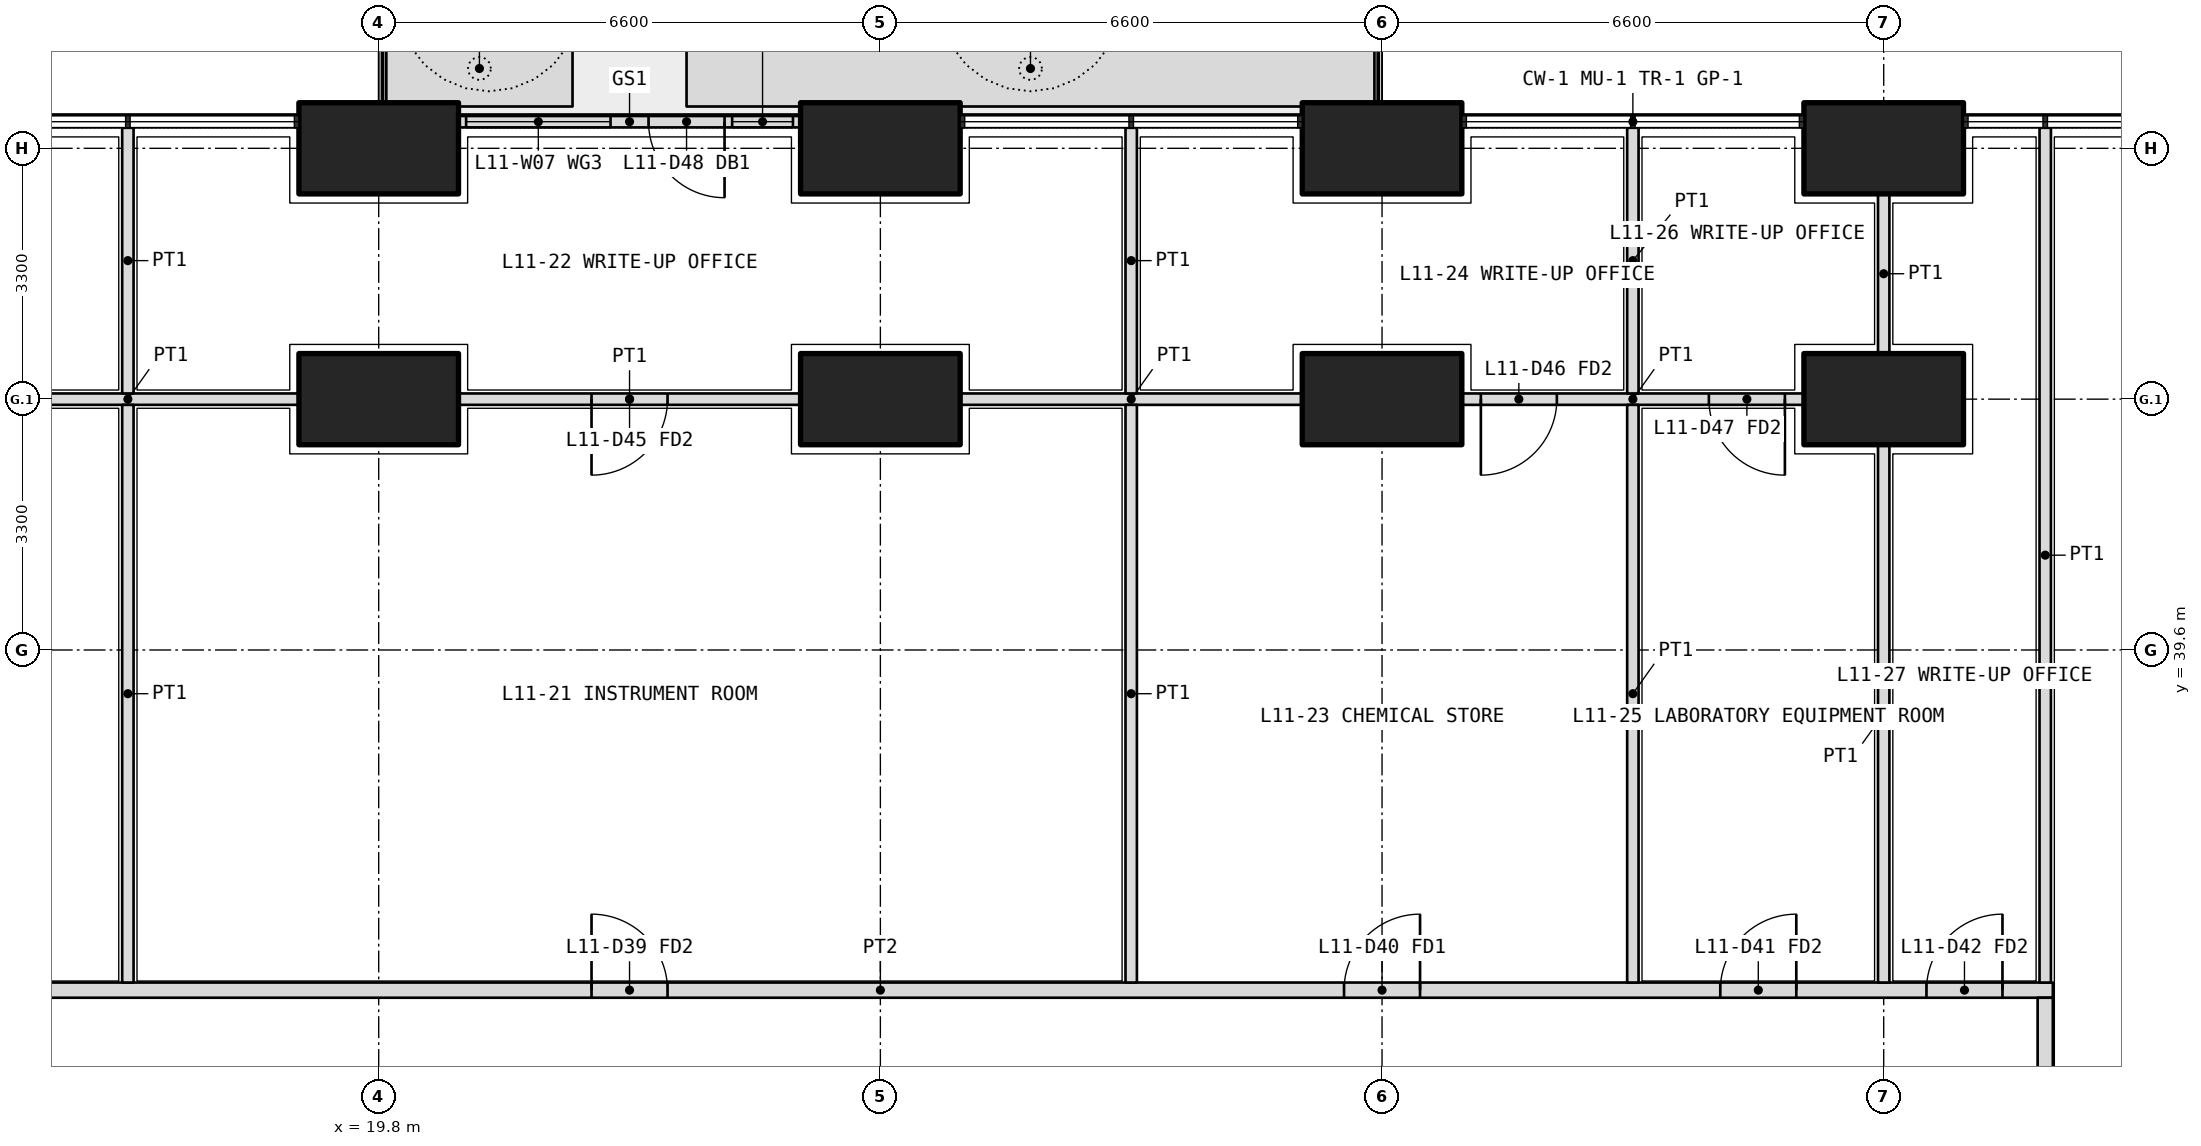
"""IFC4 building model, lengths in metres.
Left out: names, types, materials, properties, quantities, classifications, styles, units other than length and angle.
Written with IfcOpenShell. Run it as: python <this file> out.ifc"""

import sys

from ifc_helpers import new_model, si_unit, direction, frame, frame_2d, origin, origin_2d, place, context, subcontext, project, spatial, polyline, rectangle, outline, extrude, element, fill, save


model = new_model("IFC4")
c1 = context("Model", 3, precision=1e-05, world=origin(), true_north=direction((0.0, 1.0)))
c2 = subcontext(c1, "Body", "Model", "MODEL_VIEW")
j1 = project(units=[si_unit("LENGTHUNIT", "METRE"), si_unit("PLANEANGLEUNIT", "RADIAN")], contexts=[c1])
p1 = place(None, origin())
s1 = spatial("IfcSite", under=j1, at=p1, CompositionType="ELEMENT")
p2 = place(p1, origin())
s2 = spatial("IfcBuilding", under=s1, at=p2, CompositionType="ELEMENT")
p3 = place(p2, frame((0.0, 0.0, 50.7)))
s3 = spatial("IfcBuildingStorey", under=s2, at=p3, CompositionType="ELEMENT", Elevation=50.7)
for number, where, z_axis, x_axis in (
    (1, (19.8, 46.2, 0.0), (0.0, 0.0, 1.0), (1.0, 0.0, 0.0)),
    (2, (26.4, 46.2, 0.0), (0.0, 0.0, 1.0), (1.0, 0.0, 0.0)),
    (3, (33.0, 46.2, 0.0), (0.0, 0.0, 1.0), (1.0, 0.0, 0.0)),
    (4, (39.6, 46.2, 0.0), (0.0, 0.0, 1.0), (1.0, 0.0, 0.0)),
    (5, (19.8, 42.9, 0.0), (0.0, 0.0, 1.0), (1.0, 0.0, 0.0)),
    (6, (26.4, 42.9, 0.0), (0.0, 0.0, 1.0), (1.0, 0.0, 0.0)),
    (7, (33.0, 42.9, 0.0), (0.0, 0.0, 1.0), (1.0, 0.0, 0.0)),
    (8, (39.6, 42.9, 0.0), (0.0, 0.0, 1.0), (1.0, 0.0, 0.0)),
):
    element("IfcColumn", number, at=place(p3, frame(where, z_axis=z_axis, x_axis=x_axis)), inside=s3, PredefinedType="COLUMN", context=c2, shape_type="SweptSolid", body=[
        extrude(rectangle(XDim=2.1, YDim=1.2, at=origin_2d()), origin(), (0.0, 0.0, 1.0), 4.2),
    ])
p4 = place(p3, origin())
e9 = element("IfcWall", 9, at=p4, inside=s3, PredefinedType="USERDEFINED", context=c2, shape_type="SweptSolid", body=[
    extrude(outline(polyline([(19.9, 46.75), (22.35, 46.75), (22.35, 47.75), (19.9, 47.75), (19.9, 46.75)]), holes=[polyline([(20.05, 46.9), (22.2, 46.9), (22.2, 47.6), (20.05, 47.6), (20.05, 46.9)])]), origin(), (0.0, 0.0, 1.0), 1.05),
])
p5 = place(p3, origin())
e10 = element("IfcWall", 10, at=p5, inside=s3, PredefinedType="USERDEFINED", context=c2, shape_type="SweptSolid", body=[
    extrude(outline(polyline([(23.85, 46.75), (32.9, 46.75), (32.9, 47.75), (23.85, 47.75), (23.85, 46.75)]), holes=[polyline([(24.0, 46.9), (32.75, 46.9), (32.75, 47.6), (24.0, 47.6), (24.0, 46.9)])]), origin(), (0.0, 0.0, 1.0), 1.05),
])
p6 = place(p3, frame((25.35, 46.55, 0.0), z_axis=(0.0, 0.0, 1.0), x_axis=(-1.0, 0.0, 0.0)))
e11 = element("IfcWall", 11, at=p6, inside=s3, PredefinedType="SOLIDWALL", context=c2, shape_type="SweptSolid", body=[
    extrude(rectangle(XDim=4.5, YDim=0.15, at=frame_2d((2.25, 0.0))), origin(), (0.0, 0.0, 1.0), 2.7),
])
p7 = place(p6, frame((1.0, 0.0, 0.0)))
e12 = element("IfcOpeningElement", 12, at=p7, cuts=e11, PredefinedType="OPENING", context=c2, shape_type="SweptSolid", body=[
    extrude(rectangle(XDim=1.0, YDim=2.4, at=frame_2d((0.5, 1.2))), frame((0.0, 0.085, 0.0), z_axis=(0.0, -1.0, 0.0), x_axis=(1.0, 0.0, 0.0)), (0.0, 0.0, 1.0), 0.17),
])
p8 = place(p6, frame((0.1, 0.0, 0.1)))
e13 = element("IfcOpeningElement", 13, at=p8, cuts=e11, PredefinedType="OPENING", context=c2, shape_type="SweptSolid", body=[
    extrude(rectangle(XDim=0.8, YDim=2.3, at=frame_2d((0.4, 1.15))), frame((0.0, 0.085, 0.0), z_axis=(0.0, -1.0, 0.0), x_axis=(1.0, 0.0, 0.0)), (0.0, 0.0, 1.0), 0.17),
])
p9 = place(p6, frame((2.5, 0.0, 0.1)))
e14 = element("IfcOpeningElement", 14, at=p9, cuts=e11, PredefinedType="OPENING", context=c2, shape_type="SweptSolid", body=[
    extrude(rectangle(XDim=1.9, YDim=2.3, at=frame_2d((0.95, 1.15))), frame((0.0, 0.085, 0.0), z_axis=(0.0, -1.0, 0.0), x_axis=(1.0, 0.0, 0.0)), (0.0, 0.0, 1.0), 0.17),
])
p10 = place(p3, frame((10.975, 35.125, 0.0), z_axis=(0.0, 0.0, 1.0), x_axis=(1.0, 0.0, 0.0)))
e15 = element("IfcWall", 15, at=p10, inside=s3, PredefinedType="PARTITIONING", context=c2, shape_type="SweptSolid", body=[
    extrude(rectangle(XDim=30.85, YDim=0.2, at=frame_2d((15.425, 0.0))), origin(), (0.0, 0.0, 1.0), 2.85),
])
p11 = place(p10, frame((2.312, 0.0, 0.0)))
e16 = element("IfcOpeningElement", 16, at=p11, cuts=e15, PredefinedType="OPENING", context=c2, shape_type="SweptSolid", body=[
    extrude(rectangle(XDim=1.0, YDim=2.1, at=frame_2d((0.5, 1.05))), frame((0.0, 0.11, 0.0), z_axis=(0.0, -1.0, 0.0), x_axis=(1.0, 0.0, 0.0)), (0.0, 0.0, 1.0), 0.22),
])
p12 = place(p10, frame((11.625, 0.0, 0.0)))
e17 = element("IfcOpeningElement", 17, at=p12, cuts=e15, PredefinedType="OPENING", context=c2, shape_type="SweptSolid", body=[
    extrude(rectangle(XDim=1.0, YDim=2.1, at=frame_2d((0.5, 1.05))), frame((0.0, 0.11, 0.0), z_axis=(0.0, -1.0, 0.0), x_axis=(1.0, 0.0, 0.0)), (0.0, 0.0, 1.0), 0.22),
])
p13 = place(p10, frame((21.525, 0.0, 0.0)))
e18 = element("IfcOpeningElement", 18, at=p13, cuts=e15, PredefinedType="OPENING", context=c2, shape_type="SweptSolid", body=[
    extrude(rectangle(XDim=1.0, YDim=2.1, at=frame_2d((0.5, 1.05))), frame((0.0, 0.11, 0.0), z_axis=(0.0, -1.0, 0.0), x_axis=(1.0, 0.0, 0.0)), (0.0, 0.0, 1.0), 0.22),
])
p14 = place(p10, frame((26.475, 0.0, 0.0)))
e19 = element("IfcOpeningElement", 19, at=p14, cuts=e15, PredefinedType="OPENING", context=c2, shape_type="SweptSolid", body=[
    extrude(rectangle(XDim=1.0, YDim=2.1, at=frame_2d((0.5, 1.05))), frame((0.0, 0.11, 0.0), z_axis=(0.0, -1.0, 0.0), x_axis=(1.0, 0.0, 0.0)), (0.0, 0.0, 1.0), 0.22),
])
p15 = place(p10, frame((29.188, 0.0, 0.0)))
e20 = element("IfcOpeningElement", 20, at=p15, cuts=e15, PredefinedType="OPENING", context=c2, shape_type="SweptSolid", body=[
    extrude(rectangle(XDim=1.0, YDim=2.1, at=frame_2d((0.5, 1.05))), frame((0.0, 0.11, 0.0), z_axis=(0.0, -1.0, 0.0), x_axis=(1.0, 0.0, 0.0)), (0.0, 0.0, 1.0), 0.22),
])
p16 = place(p3, frame((41.725, 11.175, 0.0), z_axis=(0.0, 0.0, 1.0), x_axis=(0.0, 1.0, 0.0)))
e21 = element("IfcWall", 21, at=p16, inside=s3, PredefinedType="PARTITIONING", context=c2, shape_type="SweptSolid", body=[
    extrude(rectangle(XDim=23.85, YDim=0.2, at=frame_2d((11.925, 0.0))), origin(), (0.0, 0.0, 1.0), 2.85),
])
p17 = place(p16, frame((2.012, 0.0, 0.0)))
e22 = element("IfcOpeningElement", 22, at=p17, cuts=e21, PredefinedType="OPENING", context=c2, shape_type="SweptSolid", body=[
    extrude(rectangle(XDim=1.2, YDim=2.1, at=frame_2d((0.6, 1.05))), frame((0.0, 0.11, 0.0), z_axis=(0.0, -1.0, 0.0), x_axis=(1.0, 0.0, 0.0)), (0.0, 0.0, 1.0), 0.22),
])
p18 = place(p16, frame((6.475, 0.0, 0.0)))
e23 = element("IfcOpeningElement", 23, at=p18, cuts=e21, PredefinedType="OPENING", context=c2, shape_type="SweptSolid", body=[
    extrude(rectangle(XDim=1.0, YDim=2.1, at=frame_2d((0.5, 1.05))), frame((0.0, 0.11, 0.0), z_axis=(0.0, -1.0, 0.0), x_axis=(1.0, 0.0, 0.0)), (0.0, 0.0, 1.0), 0.22),
])
p19 = place(p16, frame((9.725, 0.0, 0.0)))
e24 = element("IfcOpeningElement", 24, at=p19, cuts=e21, PredefinedType="OPENING", context=c2, shape_type="SweptSolid", body=[
    extrude(rectangle(XDim=1.0, YDim=2.1, at=frame_2d((0.5, 1.05))), frame((0.0, 0.11, 0.0), z_axis=(0.0, -1.0, 0.0), x_axis=(1.0, 0.0, 0.0)), (0.0, 0.0, 1.0), 0.22),
])
p20 = place(p16, frame((13.075, 0.0, 0.0)))
e25 = element("IfcOpeningElement", 25, at=p20, cuts=e21, PredefinedType="OPENING", context=c2, shape_type="SweptSolid", body=[
    extrude(rectangle(XDim=0.9, YDim=2.1, at=frame_2d((0.45, 1.05))), frame((0.0, 0.11, 0.0), z_axis=(0.0, -1.0, 0.0), x_axis=(1.0, 0.0, 0.0)), (0.0, 0.0, 1.0), 0.22),
])
p21 = place(p16, frame((16.375, 0.0, 0.0)))
e26 = element("IfcOpeningElement", 26, at=p21, cuts=e21, PredefinedType="OPENING", context=c2, shape_type="SweptSolid", body=[
    extrude(rectangle(XDim=1.0, YDim=2.1, at=frame_2d((0.5, 1.05))), frame((0.0, 0.11, 0.0), z_axis=(0.0, -1.0, 0.0), x_axis=(1.0, 0.0, 0.0)), (0.0, 0.0, 1.0), 0.22),
])
p22 = place(p16, frame((20.738, 0.0, 0.0)))
e27 = element("IfcOpeningElement", 27, at=p22, cuts=e21, PredefinedType="OPENING", context=c2, shape_type="SweptSolid", body=[
    extrude(rectangle(XDim=1.0, YDim=2.1, at=frame_2d((0.5, 1.05))), frame((0.0, 0.11, 0.0), z_axis=(0.0, -1.0, 0.0), x_axis=(1.0, 0.0, 0.0)), (0.0, 0.0, 1.0), 0.22),
])
p23 = place(p3, frame((41.725, 46.47, 0.0), z_axis=(0.0, 0.0, 1.0), x_axis=(0.0, -1.0, 0.0)))
e28 = element("IfcWall", 28, at=p23, inside=s3, PredefinedType="PARTITIONING", context=c2, shape_type="SweptSolid", body=[
    extrude(rectangle(XDim=11.245, YDim=0.15, at=frame_2d((5.623, 0.0))), origin(), (0.0, 0.0, 1.0), 2.7),
])
p24 = place(p3, frame((38.55, 42.9, 0.0), z_axis=(0.0, 0.0, 1.0), x_axis=(-1.0, 0.0, 0.0)))
e29 = element("IfcWall", 29, at=p24, inside=s3, PredefinedType="PARTITIONING", context=c2, shape_type="SweptSolid", body=[
    extrude(rectangle(XDim=4.5, YDim=0.15, at=frame_2d((2.25, 0.0))), origin(), (0.0, 0.0, 1.0), 3.9),
])
p25 = place(p24, frame((3.25, 0.0, 0.0)))
e30 = element("IfcOpeningElement", 30, at=p25, cuts=e29, PredefinedType="OPENING", context=c2, shape_type="SweptSolid", body=[
    extrude(rectangle(XDim=1.0, YDim=2.1, at=frame_2d((0.5, 1.05))), frame((0.0, 0.085, 0.0), z_axis=(0.0, -1.0, 0.0), x_axis=(1.0, 0.0, 0.0)), (0.0, 0.0, 1.0), 0.17),
])
p26 = place(p24, frame((0.25, 0.0, 0.0)))
e31 = element("IfcOpeningElement", 31, at=p26, cuts=e29, PredefinedType="OPENING", context=c2, shape_type="SweptSolid", body=[
    extrude(rectangle(XDim=1.0, YDim=2.1, at=frame_2d((0.5, 1.05))), frame((0.0, 0.085, 0.0), z_axis=(0.0, -1.0, 0.0), x_axis=(1.0, 0.0, 0.0)), (0.0, 0.0, 1.0), 0.17),
])
p27 = place(p3, frame((31.95, 42.9, 0.0), z_axis=(0.0, 0.0, 1.0), x_axis=(-1.0, 0.0, 0.0)))
e32 = element("IfcWall", 32, at=p27, inside=s3, PredefinedType="PARTITIONING", context=c2, shape_type="SweptSolid", body=[
    extrude(rectangle(XDim=4.5, YDim=0.15, at=frame_2d((2.25, 0.0))), origin(), (0.0, 0.0, 1.0), 3.9),
])
p28 = place(p3, frame((25.35, 42.9, 0.0), z_axis=(0.0, 0.0, 1.0), x_axis=(-1.0, 0.0, 0.0)))
e33 = element("IfcWall", 33, at=p28, inside=s3, PredefinedType="PARTITIONING", context=c2, shape_type="SweptSolid", body=[
    extrude(rectangle(XDim=4.5, YDim=0.15, at=frame_2d((2.25, 0.0))), origin(), (0.0, 0.0, 1.0), 3.9),
])
p29 = place(p28, frame((1.75, 0.0, 0.0)))
e34 = element("IfcOpeningElement", 34, at=p29, cuts=e33, PredefinedType="OPENING", context=c2, shape_type="SweptSolid", body=[
    extrude(rectangle(XDim=1.0, YDim=2.1, at=frame_2d((0.5, 1.05))), frame((0.0, 0.085, 0.0), z_axis=(0.0, -1.0, 0.0), x_axis=(1.0, 0.0, 0.0)), (0.0, 0.0, 1.0), 0.17),
])
p30 = place(p3, frame((18.75, 42.9, 0.0), z_axis=(0.0, 0.0, 1.0), x_axis=(-1.0, 0.0, 0.0)))
e35 = element("IfcWall", 35, at=p30, inside=s3, PredefinedType="PARTITIONING", context=c2, shape_type="SweptSolid", body=[
    extrude(rectangle(XDim=4.5, YDim=0.15, at=frame_2d((2.25, 0.0))), origin(), (0.0, 0.0, 1.0), 3.9),
])
p31 = place(p3, frame((16.5, 46.47, 0.0), z_axis=(0.0, 0.0, 1.0), x_axis=(0.0, -1.0, 0.0)))
e36 = element("IfcWall", 36, at=p31, inside=s3, PredefinedType="PARTITIONING", context=c2, shape_type="SweptSolid", body=[
    extrude(rectangle(XDim=3.495, YDim=0.15, at=frame_2d((1.748, 0.0))), origin(), (0.0, 0.0, 1.0), 2.7),
])
p32 = place(p3, frame((16.5, 42.825, 0.0), z_axis=(0.0, 0.0, 1.0), x_axis=(0.0, -1.0, 0.0)))
e37 = element("IfcWall", 37, at=p32, inside=s3, PredefinedType="PARTITIONING", context=c2, shape_type="SweptSolid", body=[
    extrude(rectangle(XDim=7.6, YDim=0.15, at=frame_2d((3.8, 0.0))), origin(), (0.0, 0.0, 1.0), 3.9),
])
p33 = place(p3, frame((29.7, 46.47, 0.0), z_axis=(0.0, 0.0, 1.0), x_axis=(0.0, -1.0, 0.0)))
e38 = element("IfcWall", 38, at=p33, inside=s3, PredefinedType="PARTITIONING", context=c2, shape_type="SweptSolid", body=[
    extrude(rectangle(XDim=3.495, YDim=0.15, at=frame_2d((1.748, 0.0))), origin(), (0.0, 0.0, 1.0), 2.7),
])
p34 = place(p3, frame((29.7, 42.825, 0.0), z_axis=(0.0, 0.0, 1.0), x_axis=(0.0, -1.0, 0.0)))
e39 = element("IfcWall", 39, at=p34, inside=s3, PredefinedType="PARTITIONING", context=c2, shape_type="SweptSolid", body=[
    extrude(rectangle(XDim=7.6, YDim=0.15, at=frame_2d((3.8, 0.0))), origin(), (0.0, 0.0, 1.0), 3.9),
])
p35 = place(p3, frame((36.3, 46.47, 0.0), z_axis=(0.0, 0.0, 1.0), x_axis=(0.0, -1.0, 0.0)))
e40 = element("IfcWall", 40, at=p35, inside=s3, PredefinedType="PARTITIONING", context=c2, shape_type="SweptSolid", body=[
    extrude(rectangle(XDim=3.495, YDim=0.15, at=frame_2d((1.748, 0.0))), origin(), (0.0, 0.0, 1.0), 2.7),
])
p36 = place(p3, frame((36.3, 42.825, 0.0), z_axis=(0.0, 0.0, 1.0), x_axis=(0.0, -1.0, 0.0)))
e41 = element("IfcWall", 41, at=p36, inside=s3, PredefinedType="PARTITIONING", context=c2, shape_type="SweptSolid", body=[
    extrude(rectangle(XDim=7.6, YDim=0.15, at=frame_2d((3.8, 0.0))), origin(), (0.0, 0.0, 1.0), 3.9),
])
p37 = place(p3, frame((39.6, 45.6, 0.0), z_axis=(0.0, 0.0, 1.0), x_axis=(0.0, -1.0, 0.0)))
e42 = element("IfcWall", 42, at=p37, inside=s3, PredefinedType="PARTITIONING", context=c2, shape_type="SweptSolid", body=[
    extrude(rectangle(XDim=2.1, YDim=0.15, at=frame_2d((1.05, 0.0))), origin(), (0.0, 0.0, 1.0), 2.85),
])
p38 = place(p3, frame((39.6, 42.3, 0.0), z_axis=(0.0, 0.0, 1.0), x_axis=(0.0, -1.0, 0.0)))
e43 = element("IfcWall", 43, at=p38, inside=s3, PredefinedType="PARTITIONING", context=c2, shape_type="SweptSolid", body=[
    extrude(rectangle(XDim=7.075, YDim=0.15, at=frame_2d((3.538, 0.0))), origin(), (0.0, 0.0, 1.0), 2.85),
])
p39 = place(p7, origin())
e44 = element("IfcDoor", 44, at=p39, inside=s3, OperationType="SINGLE_SWING_LEFT", PredefinedType="DOOR", context=c2, shape_type="SweptSolid", body=[
    extrude(rectangle(XDim=1.0, YDim=2.4, at=frame_2d((0.5, 1.2))), frame((0.0, 0.025, 0.0), z_axis=(0.0, -1.0, 0.0), x_axis=(1.0, 0.0, 0.0)), (0.0, 0.0, 1.0), 0.05),
])
fill(e12, e44)
p40 = place(p8, origin())
e45 = element("IfcWindow", 45, at=p40, inside=s3, PartitioningType="SINGLE_PANEL", PredefinedType="WINDOW", context=c2, shape_type="SweptSolid", body=[
    extrude(rectangle(XDim=0.8, YDim=2.3, at=frame_2d((0.4, 1.15))), frame((0.0, 0.03, 0.0), z_axis=(0.0, -1.0, 0.0), x_axis=(1.0, 0.0, 0.0)), (0.0, 0.0, 1.0), 0.06),
])
fill(e13, e45)
p41 = place(p9, origin())
e46 = element("IfcWindow", 46, at=p41, inside=s3, PartitioningType="SINGLE_PANEL", PredefinedType="WINDOW", context=c2, shape_type="SweptSolid", body=[
    extrude(rectangle(XDim=1.9, YDim=2.3, at=frame_2d((0.95, 1.15))), frame((0.0, 0.03, 0.0), z_axis=(0.0, -1.0, 0.0), x_axis=(1.0, 0.0, 0.0)), (0.0, 0.0, 1.0), 0.06),
])
fill(e14, e46)
p42 = place(p12, origin())
e47 = element("IfcDoor", 47, at=p42, inside=s3, OperationType="SINGLE_SWING_LEFT", PredefinedType="DOOR", context=c2, shape_type="SweptSolid", body=[
    extrude(rectangle(XDim=1.0, YDim=2.1, at=frame_2d((0.5, 1.05))), frame((0.0, 0.025, 0.0), z_axis=(0.0, -1.0, 0.0), x_axis=(1.0, 0.0, 0.0)), (0.0, 0.0, 1.0), 0.05),
])
fill(e17, e47)
p43 = place(p29, origin())
e48 = element("IfcDoor", 48, at=p43, inside=s3, OperationType="SINGLE_SWING_RIGHT", PredefinedType="DOOR", context=c2, shape_type="SweptSolid", body=[
    extrude(rectangle(XDim=1.0, YDim=2.1, at=frame_2d((0.5, 1.05))), frame((0.0, 0.025, 0.0), z_axis=(0.0, -1.0, 0.0), x_axis=(1.0, 0.0, 0.0)), (0.0, 0.0, 1.0), 0.05),
])
fill(e34, e48)
p44 = place(p13, origin())
e49 = element("IfcDoor", 49, at=p44, inside=s3, OperationType="SINGLE_SWING_RIGHT", PredefinedType="DOOR", context=c2, shape_type="SweptSolid", body=[
    extrude(rectangle(XDim=1.0, YDim=2.1, at=frame_2d((0.5, 1.05))), frame((0.0, 0.025, 0.0), z_axis=(0.0, -1.0, 0.0), x_axis=(1.0, 0.0, 0.0)), (0.0, 0.0, 1.0), 0.05),
])
fill(e18, e49)
p45 = place(p25, origin())
e50 = element("IfcDoor", 50, at=p45, inside=s3, OperationType="SINGLE_SWING_RIGHT", PredefinedType="DOOR", context=c2, shape_type="SweptSolid", body=[
    extrude(rectangle(XDim=1.0, YDim=2.1, at=frame_2d((0.5, 1.05))), frame((0.0, 0.025, 0.0), z_axis=(0.0, -1.0, 0.0), x_axis=(1.0, 0.0, 0.0)), (0.0, 0.0, 1.0), 0.05),
])
fill(e30, e50)
p46 = place(p14, origin())
e51 = element("IfcDoor", 51, at=p46, inside=s3, OperationType="SINGLE_SWING_RIGHT", PredefinedType="DOOR", context=c2, shape_type="SweptSolid", body=[
    extrude(rectangle(XDim=1.0, YDim=2.1, at=frame_2d((0.5, 1.05))), frame((0.0, 0.025, 0.0), z_axis=(0.0, -1.0, 0.0), x_axis=(1.0, 0.0, 0.0)), (0.0, 0.0, 1.0), 0.05),
])
fill(e19, e51)
p47 = place(p26, origin())
e52 = element("IfcDoor", 52, at=p47, inside=s3, OperationType="SINGLE_SWING_LEFT", PredefinedType="DOOR", context=c2, shape_type="SweptSolid", body=[
    extrude(rectangle(XDim=1.0, YDim=2.1, at=frame_2d((0.5, 1.05))), frame((0.0, 0.025, 0.0), z_axis=(0.0, -1.0, 0.0), x_axis=(1.0, 0.0, 0.0)), (0.0, 0.0, 1.0), 0.05),
])
fill(e31, e52)
p48 = place(p15, origin())
e53 = element("IfcDoor", 53, at=p48, inside=s3, OperationType="SINGLE_SWING_RIGHT", PredefinedType="DOOR", context=c2, shape_type="SweptSolid", body=[
    extrude(rectangle(XDim=1.0, YDim=2.1, at=frame_2d((0.5, 1.05))), frame((0.0, 0.025, 0.0), z_axis=(0.0, -1.0, 0.0), x_axis=(1.0, 0.0, 0.0)), (0.0, 0.0, 1.0), 0.05),
])
fill(e20, e53)
save(model, sys.argv[1])
